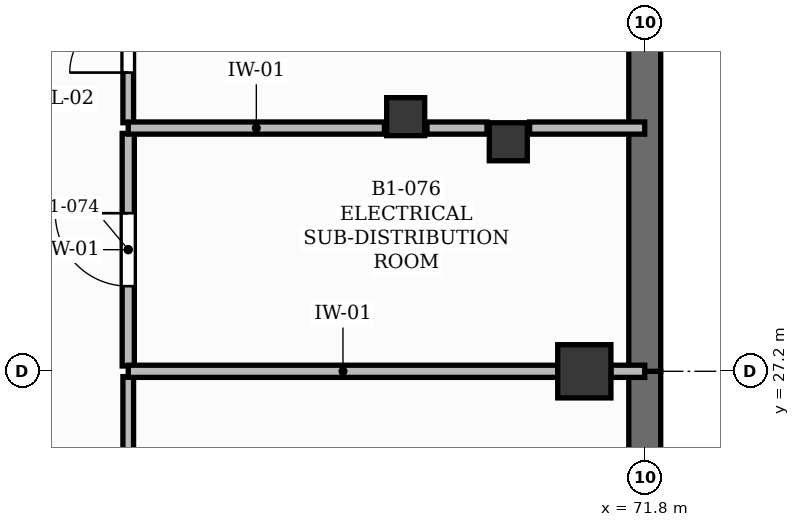
"""IFC4 building model, lengths in metres.
Left out: names, types, materials, properties, quantities, classifications, styles, units other than length and angle.
Written with IfcOpenShell. Run it as: python <this file> out.ifc"""

import sys

from ifc_helpers import new_model, si_unit, direction, frame, frame_2d, origin, origin_2d, place, context, subcontext, project, spatial, rectangle, extrude, element, fill, save


model = new_model("IFC4")
c1 = context("Model", 3, precision=1e-05, world=origin(), true_north=direction((0.0, 1.0)))
c2 = subcontext(c1, "Body", "Model", "MODEL_VIEW")
j1 = project(units=[si_unit("LENGTHUNIT", "METRE"), si_unit("PLANEANGLEUNIT", "RADIAN")], contexts=[c1])
p1 = place(None, origin())
s1 = spatial("IfcSite", under=j1, at=p1, CompositionType="ELEMENT")
p2 = place(p1, origin())
s2 = spatial("IfcBuilding", under=s1, at=p2, CompositionType="ELEMENT")
p3 = place(p2, frame((0.0, 0.0, -4.5)))
s3 = spatial("IfcBuildingStorey", under=s2, at=p3, CompositionType="ELEMENT", Elevation=-4.5)
p4 = place(p3, frame((71.0, 27.2, 0.0), z_axis=(0.0, 0.0, 1.0), x_axis=(1.0, 0.0, 0.0)))
e1 = element("IfcColumn", 1, at=p4, inside=s3, PredefinedType="COLUMN", context=c2, shape_type="SweptSolid", body=[
    extrude(rectangle(XDim=0.7, YDim=0.7, at=origin_2d()), origin(), (0.0, 0.0, 1.0), 4.2),
])
p5 = place(p3, frame((71.795, 18.6, 0.0), z_axis=(0.0, 0.0, 1.0), x_axis=(0.0, 1.0, 0.0)))
e2 = element("IfcWall", 2, at=p5, inside=s3, PredefinedType="USERDEFINED", context=c2, shape_type="SweptSolid", body=[
    extrude(rectangle(XDim=8.6, YDim=0.42, at=frame_2d((4.3, 0.0))), origin(), (0.0, 0.0, 1.0), 4.2),
])
p6 = place(p3, frame((71.795, 27.2, 0.0), z_axis=(0.0, 0.0, 1.0), x_axis=(0.0, 1.0, 0.0)))
e3 = element("IfcWall", 3, at=p6, inside=s3, PredefinedType="USERDEFINED", context=c2, shape_type="SweptSolid", body=[
    extrude(rectangle(XDim=9.6, YDim=0.42, at=frame_2d((4.8, 0.0))), origin(), (0.0, 0.0, 1.0), 4.2),
])
for number, where, z_axis, x_axis in (
    (4, (70.0, 30.22, 0.0), (0.0, 0.0, 1.0), (1.0, 0.0, 0.0)),
    (5, (68.65, 30.55, 0.0), (0.0, 0.0, 1.0), (1.0, 0.0, 0.0)),
):
    element("IfcColumn", number, at=place(p3, frame(where, z_axis=z_axis, x_axis=x_axis)), inside=s3, PredefinedType="COLUMN", context=c2, shape_type="SweptSolid", body=[
        extrude(rectangle(XDim=0.5, YDim=0.5, at=origin_2d()), origin(), (0.0, 0.0, 1.0), 4.2),
    ])
p7 = place(p3, frame((65.0, 18.67, 0.0), z_axis=(0.0, 0.0, 1.0), x_axis=(0.0, 1.0, 0.0)))
e6 = element("IfcWall", 6, at=p7, inside=s3, PredefinedType="PARTITIONING", context=c2, shape_type="SweptSolid", body=[
    extrude(rectangle(XDim=8.46, YDim=0.14, at=frame_2d((4.23, 0.0))), origin(), (0.0, 0.0, 1.0), 4.08),
])
p8 = place(p7, frame((3.78, 0.0, 0.0)))
e7 = element("IfcOpeningElement", 7, at=p8, cuts=e6, PredefinedType="OPENING", context=c2, shape_type="SweptSolid", body=[
    extrude(rectangle(XDim=0.9, YDim=2.1, at=frame_2d((0.45, 1.05))), frame((0.0, 0.08, 0.0), z_axis=(0.0, -1.0, 0.0), x_axis=(1.0, 0.0, 0.0)), (0.0, 0.0, 1.0), 0.16),
])
p9 = place(p3, frame((65.0, 27.27, 0.0), z_axis=(0.0, 0.0, 1.0), x_axis=(0.0, 1.0, 0.0)))
e8 = element("IfcWall", 8, at=p9, inside=s3, PredefinedType="PARTITIONING", context=c2, shape_type="SweptSolid", body=[
    extrude(rectangle(XDim=3.06, YDim=0.16, at=frame_2d((1.53, 0.0))), origin(), (0.0, 0.0, 1.0), 4.08),
])
p10 = place(p9, frame((1.05, 0.0, 0.0)))
e9 = element("IfcOpeningElement", 9, at=p10, cuts=e8, PredefinedType="OPENING", context=c2, shape_type="SweptSolid", body=[
    extrude(rectangle(XDim=0.96, YDim=2.1, at=frame_2d((0.48, 1.05))), frame((0.0, 0.09, 0.0), z_axis=(0.0, -1.0, 0.0), x_axis=(1.0, 0.0, 0.0)), (0.0, 0.0, 1.0), 0.18),
])
p11 = place(p3, frame((65.0, 27.2, 0.0), z_axis=(0.0, 0.0, 1.0), x_axis=(1.0, 0.0, 0.0)))
e10 = element("IfcWall", 10, at=p11, inside=s3, PredefinedType="PARTITIONING", context=c2, shape_type="SweptSolid", body=[
    extrude(rectangle(XDim=5.65, YDim=0.16, at=frame_2d((2.825, 0.0))), origin(), (0.0, 0.0, 1.0), 3.4),
])
p12 = place(p3, frame((71.35, 27.2, 0.0), z_axis=(0.0, 0.0, 1.0), x_axis=(1.0, 0.0, 0.0)))
e11 = element("IfcWall", 11, at=p12, inside=s3, PredefinedType="PARTITIONING", context=c2, shape_type="SweptSolid", body=[
    extrude(rectangle(XDim=0.445, YDim=0.16, at=frame_2d((0.222, 0.0))), origin(), (0.0, 0.0, 1.0), 4.08),
])
p13 = place(p3, frame((65.0, 30.47, 0.0), z_axis=(0.0, 0.0, 1.0), x_axis=(0.0, 1.0, 0.0)))
e12 = element("IfcWall", 12, at=p13, inside=s3, PredefinedType="PARTITIONING", context=c2, shape_type="SweptSolid", body=[
    extrude(rectangle(XDim=2.86, YDim=0.14, at=frame_2d((1.43, 0.0))), origin(), (0.0, 0.0, 1.0), 4.08),
])
p14 = place(p13, frame((0.66, 0.0, 0.0)))
e13 = element("IfcOpeningElement", 13, at=p14, cuts=e12, PredefinedType="OPENING", context=c2, shape_type="SweptSolid", body=[
    extrude(rectangle(XDim=1.54, YDim=2.25, at=frame_2d((0.77, 1.125))), frame((0.0, 0.08, 0.0), z_axis=(0.0, -1.0, 0.0), x_axis=(1.0, 0.0, 0.0)), (0.0, 0.0, 1.0), 0.16),
])
p15 = place(p3, frame((65.0, 30.4, 0.0), z_axis=(0.0, 0.0, 1.0), x_axis=(1.0, 0.0, 0.0)))
e14 = element("IfcWall", 14, at=p15, inside=s3, PredefinedType="PARTITIONING", context=c2, shape_type="SweptSolid", body=[
    extrude(rectangle(XDim=3.37, YDim=0.16, at=frame_2d((1.685, 0.0))), origin(), (0.0, 0.0, 1.0), 4.08),
])
p16 = place(p3, frame((68.93, 30.4, 0.0), z_axis=(0.0, 0.0, 1.0), x_axis=(1.0, 0.0, 0.0)))
e15 = element("IfcWall", 15, at=p16, inside=s3, PredefinedType="PARTITIONING", context=c2, shape_type="SweptSolid", body=[
    extrude(rectangle(XDim=0.79, YDim=0.16, at=frame_2d((0.395, 0.0))), origin(), (0.0, 0.0, 1.0), 4.08),
])
p17 = place(p3, frame((70.28, 30.4, 0.0), z_axis=(0.0, 0.0, 1.0), x_axis=(1.0, 0.0, 0.0)))
e16 = element("IfcWall", 16, at=p17, inside=s3, PredefinedType="PARTITIONING", context=c2, shape_type="SweptSolid", body=[
    extrude(rectangle(XDim=1.515, YDim=0.16, at=frame_2d((0.757, 0.0))), origin(), (0.0, 0.0, 1.0), 4.08),
])
p18 = place(p14, origin())
e17 = element("IfcDoor", 17, at=p18, inside=s3, OperationType="DOUBLE_DOOR_SINGLE_SWING", PredefinedType="DOOR", context=c2, shape_type="SweptSolid", body=[
    extrude(rectangle(XDim=1.54, YDim=2.25, at=frame_2d((0.77, 1.125))), frame((0.0, 0.025, 0.0), z_axis=(0.0, -1.0, 0.0), x_axis=(1.0, 0.0, 0.0)), (0.0, 0.0, 1.0), 0.05),
])
fill(e13, e17)
p19 = place(p10, origin())
e18 = element("IfcDoor", 18, at=p19, inside=s3, OperationType="SINGLE_SWING_RIGHT", PredefinedType="DOOR", context=c2, shape_type="SweptSolid", body=[
    extrude(rectangle(XDim=0.96, YDim=2.1, at=frame_2d((0.48, 1.05))), frame((0.0, 0.025, 0.0), z_axis=(0.0, -1.0, 0.0), x_axis=(1.0, 0.0, 0.0)), (0.0, 0.0, 1.0), 0.05),
])
fill(e9, e18)
save(model, sys.argv[1])
